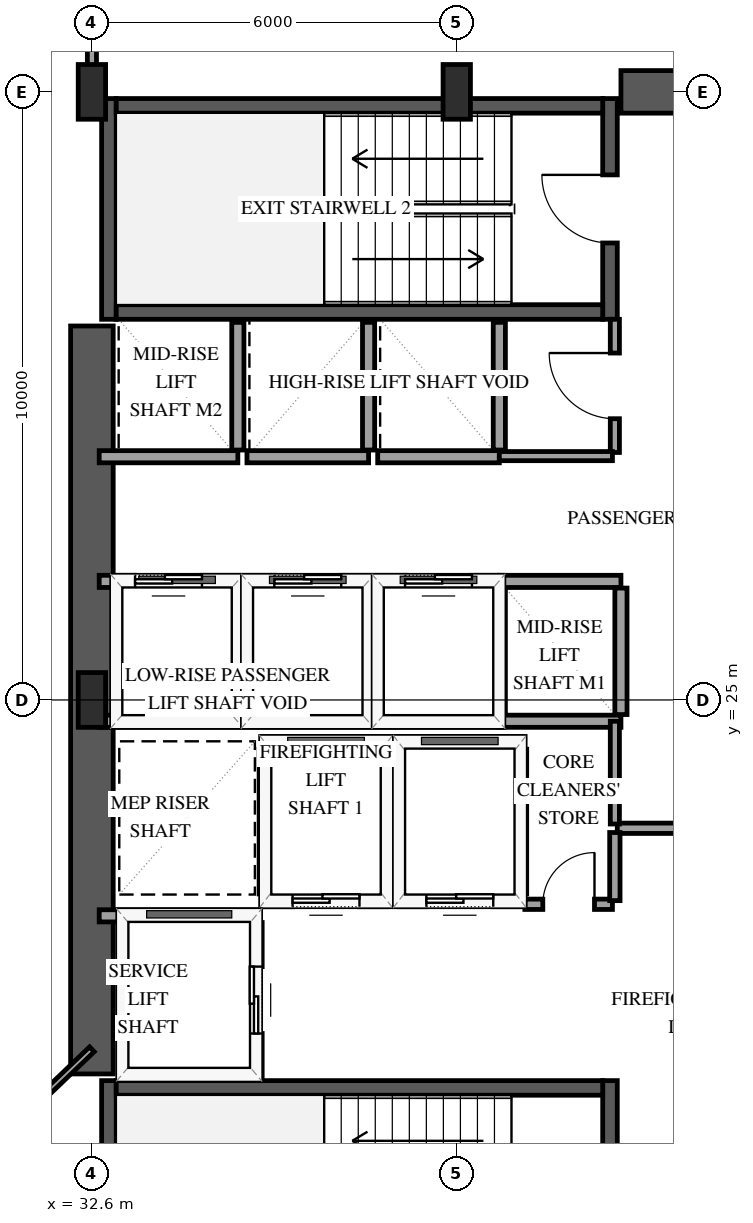
"""IFC4 building model, lengths in metres.
Left out: names, types, materials, properties, quantities, classifications, styles, units other than length and angle.
Written with IfcOpenShell. Run it as: python <this file> out.ifc"""

import sys

from ifc_helpers import new_model, si_unit, direction, frame, frame_2d, origin, origin_2d, place, context, subcontext, project, spatial, rectangle, extrude, element, fill, save


model = new_model("IFC4")
c1 = context("Model", 3, precision=1e-05, world=origin(), true_north=direction((0.0, 1.0)))
c2 = subcontext(c1, "Body", "Model", "MODEL_VIEW")
j1 = project(units=[si_unit("LENGTHUNIT", "METRE"), si_unit("PLANEANGLEUNIT", "RADIAN")], contexts=[c1])
p1 = place(None, origin())
s1 = spatial("IfcSite", under=j1, at=p1, CompositionType="ELEMENT")
p2 = place(p1, origin())
s2 = spatial("IfcBuilding", under=s1, at=p2, CompositionType="ELEMENT")
p3 = place(p2, frame((0.0, 0.0, 58.6)))
s3 = spatial("IfcBuildingStorey", under=s2, at=p3, CompositionType="ELEMENT", Elevation=58.6)
p4 = place(p3, frame((32.88, 15.11, 0.0), z_axis=(0.0, 0.0, 1.0), x_axis=(0.0, 1.0, 0.0)))
e1 = element("IfcWall", 1, at=p4, inside=s3, PredefinedType="SHEAR", context=c2, shape_type="SweptSolid", body=[
    extrude(rectangle(XDim=3.63, YDim=0.24, at=frame_2d((1.815, 0.0))), origin(), (0.0, 0.0, 1.0), 4.0),
])
p5 = place(p3, frame((41.12, 15.11, 0.0), z_axis=(0.0, 0.0, 1.0), x_axis=(0.0, 1.0, 0.0)))
e2 = element("IfcWall", 2, at=p5, inside=s3, PredefinedType="SHEAR", context=c2, shape_type="SweptSolid", body=[
    extrude(rectangle(XDim=3.63, YDim=0.24, at=frame_2d((1.815, 0.0))), origin(), (0.0, 0.0, 1.0), 4.0),
])
p6 = place(p5, frame((1.255, 0.0, 0.0)))
e3 = element("IfcOpeningElement", 3, at=p6, cuts=e2, PredefinedType="OPENING", context=c2, shape_type="SweptSolid", body=[
    extrude(rectangle(XDim=1.12, YDim=2.15, at=frame_2d((0.56, 1.075))), frame((0.0, 0.13, 0.0), z_axis=(0.0, -1.0, 0.0), x_axis=(1.0, 0.0, 0.0)), (0.0, 0.0, 1.0), 0.26),
])
p7 = place(p3, frame((33.0, 18.62, 0.0), z_axis=(0.0, 0.0, 1.0), x_axis=(1.0, 0.0, 0.0)))
e4 = element("IfcWall", 4, at=p7, inside=s3, PredefinedType="SHEAR", context=c2, shape_type="SweptSolid", body=[
    extrude(rectangle(XDim=8.0, YDim=0.24, at=frame_2d((4.0, 0.0))), origin(), (0.0, 0.0, 1.0), 4.0),
])
p8 = place(p3, frame((32.88, 31.26, 0.0), z_axis=(0.0, 0.0, 1.0), x_axis=(0.0, 1.0, 0.0)))
e5 = element("IfcWall", 5, at=p8, inside=s3, PredefinedType="SHEAR", context=c2, shape_type="SweptSolid", body=[
    extrude(rectangle(XDim=3.63, YDim=0.24, at=frame_2d((1.815, 0.0))), origin(), (0.0, 0.0, 1.0), 4.0),
])
p9 = place(p3, frame((41.12, 31.26, 0.0), z_axis=(0.0, 0.0, 1.0), x_axis=(0.0, 1.0, 0.0)))
e6 = element("IfcWall", 6, at=p9, inside=s3, PredefinedType="SHEAR", context=c2, shape_type="SweptSolid", body=[
    extrude(rectangle(XDim=3.63, YDim=0.24, at=frame_2d((1.815, 0.0))), origin(), (0.0, 0.0, 1.0), 4.0),
])
p10 = place(p9, frame((1.255, 0.0, 0.0)))
e7 = element("IfcOpeningElement", 7, at=p10, cuts=e6, PredefinedType="OPENING", context=c2, shape_type="SweptSolid", body=[
    extrude(rectangle(XDim=1.12, YDim=2.15, at=frame_2d((0.56, 1.075))), frame((0.0, 0.13, 0.0), z_axis=(0.0, -1.0, 0.0), x_axis=(1.0, 0.0, 0.0)), (0.0, 0.0, 1.0), 0.26),
])
for number, where, z_axis, x_axis in (
    (8, (33.0, 31.38, 0.0), (0.0, 0.0, 1.0), (1.0, 0.0, 0.0)),
    (9, (33.0, 34.77, 0.0), (0.0, 0.0, 1.0), (1.0, 0.0, 0.0)),
):
    element("IfcWall", number, at=place(p3, frame(where, z_axis=z_axis, x_axis=x_axis)), inside=s3, PredefinedType="SHEAR", context=c2, shape_type="SweptSolid", body=[
        extrude(rectangle(XDim=8.0, YDim=0.24, at=frame_2d((4.0, 0.0))), origin(), (0.0, 0.0, 1.0), 4.0),
    ])
p11 = place(p3, frame((32.6, 18.85, 0.0), z_axis=(0.0, 0.0, 1.0), x_axis=(0.0, 1.0, 0.0)))
e10 = element("IfcWall", 10, at=p11, inside=s3, PredefinedType="SHEAR", context=c2, shape_type="SweptSolid", body=[
    extrude(rectangle(XDim=12.3, YDim=0.7, at=frame_2d((6.15, 0.0))), origin(), (0.0, 0.0, 1.0), 4.0),
])
p12 = place(p3, frame((41.3, 35.0, 0.0), z_axis=(0.0, 0.0, 1.0), x_axis=(1.0, 0.0, 0.0)))
e11 = element("IfcWall", 11, at=p12, inside=s3, PredefinedType="SHEAR", context=c2, shape_type="SweptSolid", body=[
    extrude(rectangle(XDim=2.85, YDim=0.7, at=frame_2d((1.425, 0.0))), origin(), (0.0, 0.0, 1.0), 4.0),
])
for number, where, z_axis, x_axis in (
    (12, (32.6, 25.0, 0.0), (0.0, 0.0, 1.0), (1.0, 0.0, 0.0)),
    (13, (32.6, 35.0, 0.0), (0.0, 0.0, 1.0), (1.0, 0.0, 0.0)),
    (14, (38.6, 35.0, 0.0), (0.0, 0.0, 1.0), (1.0, 0.0, 0.0)),
):
    element("IfcColumn", number, at=place(p3, frame(where, z_axis=z_axis, x_axis=x_axis)), inside=s3, PredefinedType="PILASTER", context=c2, shape_type="SweptSolid", body=[
        extrude(rectangle(XDim=0.45, YDim=0.9, at=origin_2d()), origin(), (0.0, 0.0, 1.0), 4.0),
    ])
p13 = place(p3, frame((35.45, 21.7, 0.0), z_axis=(0.0, 0.0, 1.0), x_axis=(1.0, 0.0, 0.0)))
e15 = element("IfcWall", 15, at=p13, inside=s3, PredefinedType="SOLIDWALL", context=c2, shape_type="SweptSolid", body=[
    extrude(rectangle(XDim=2.0, YDim=0.2, at=frame_2d((1.0, 0.0))), origin(), (0.0, 0.0, 1.0), 3.7),
])
p14 = place(p13, frame((0.45, 0.0, 0.0)))
e16 = element("IfcOpeningElement", 16, at=p14, cuts=e15, PredefinedType="OPENING", context=c2, shape_type="SweptSolid", body=[
    extrude(rectangle(XDim=1.1, YDim=2.15, at=frame_2d((0.55, 1.075))), frame((0.0, 0.11, 0.0), z_axis=(0.0, -1.0, 0.0), x_axis=(1.0, 0.0, 0.0)), (0.0, 0.0, 1.0), 0.22),
])
p15 = place(p3, frame((35.45, 24.3, 0.0), z_axis=(0.0, 0.0, 1.0), x_axis=(1.0, 0.0, 0.0)))
e17 = element("IfcWall", 17, at=p15, inside=s3, PredefinedType="SOLIDWALL", context=c2, shape_type="SweptSolid", body=[
    extrude(rectangle(XDim=2.0, YDim=0.2, at=frame_2d((1.0, 0.0))), origin(), (0.0, 0.0, 1.0), 3.7),
])
for number, where, z_axis, x_axis in (
    (18, (35.45, 21.81, 0.0), (0.0, 0.0, 1.0), (0.0, 1.0, 0.0)),
    (19, (37.45, 21.81, 0.0), (0.0, 0.0, 1.0), (0.0, 1.0, 0.0)),
):
    element("IfcWall", number, at=place(p3, frame(where, z_axis=z_axis, x_axis=x_axis)), inside=s3, PredefinedType="SOLIDWALL", context=c2, shape_type="SweptSolid", body=[
        extrude(rectangle(XDim=2.38, YDim=0.2, at=frame_2d((1.19, 0.0))), origin(), (0.0, 0.0, 1.0), 3.7),
    ])
p16 = place(p3, frame((37.65, 21.7, 0.0), z_axis=(0.0, 0.0, 1.0), x_axis=(1.0, 0.0, 0.0)))
e20 = element("IfcWall", 20, at=p16, inside=s3, PredefinedType="SOLIDWALL", context=c2, shape_type="SweptSolid", body=[
    extrude(rectangle(XDim=2.0, YDim=0.2, at=frame_2d((1.0, 0.0))), origin(), (0.0, 0.0, 1.0), 3.7),
])
p17 = place(p16, frame((0.45, 0.0, 0.0)))
e21 = element("IfcOpeningElement", 21, at=p17, cuts=e20, PredefinedType="OPENING", context=c2, shape_type="SweptSolid", body=[
    extrude(rectangle(XDim=1.1, YDim=2.15, at=frame_2d((0.55, 1.075))), frame((0.0, 0.11, 0.0), z_axis=(0.0, -1.0, 0.0), x_axis=(1.0, 0.0, 0.0)), (0.0, 0.0, 1.0), 0.22),
])
p18 = place(p3, frame((37.65, 24.3, 0.0), z_axis=(0.0, 0.0, 1.0), x_axis=(1.0, 0.0, 0.0)))
e22 = element("IfcWall", 22, at=p18, inside=s3, PredefinedType="SOLIDWALL", context=c2, shape_type="SweptSolid", body=[
    extrude(rectangle(XDim=2.0, YDim=0.2, at=frame_2d((1.0, 0.0))), origin(), (0.0, 0.0, 1.0), 3.7),
])
p19 = place(p3, frame((39.65, 21.81, 0.0), z_axis=(0.0, 0.0, 1.0), x_axis=(0.0, 1.0, 0.0)))
e23 = element("IfcWall", 23, at=p19, inside=s3, PredefinedType="SOLIDWALL", context=c2, shape_type="SweptSolid", body=[
    extrude(rectangle(XDim=2.38, YDim=0.2, at=frame_2d((1.19, 0.0))), origin(), (0.0, 0.0, 1.0), 3.7),
])
p20 = place(p3, frame((32.72, 21.45, 0.0), z_axis=(0.0, 0.0, 1.0), x_axis=(1.0, 0.0, 0.0)))
e24 = element("IfcWall", 24, at=p20, inside=s3, PredefinedType="SOLIDWALL", context=c2, shape_type="SweptSolid", body=[
    extrude(rectangle(XDim=2.58, YDim=0.2, at=frame_2d((1.29, 0.0))), origin(), (0.0, 0.0, 1.0), 3.7),
])
p21 = place(p3, frame((35.3, 18.79, 0.0), z_axis=(0.0, 0.0, 1.0), x_axis=(0.0, 1.0, 0.0)))
e25 = element("IfcWall", 25, at=p21, inside=s3, PredefinedType="SOLIDWALL", context=c2, shape_type="SweptSolid", body=[
    extrude(rectangle(XDim=2.55, YDim=0.2, at=frame_2d((1.275, 0.0))), origin(), (0.0, 0.0, 1.0), 3.7),
])
p22 = place(p21, frame((0.725, 0.0, 0.0)))
e26 = element("IfcOpeningElement", 26, at=p22, cuts=e25, PredefinedType="OPENING", context=c2, shape_type="SweptSolid", body=[
    extrude(rectangle(XDim=1.1, YDim=2.15, at=frame_2d((0.55, 1.075))), frame((0.0, 0.11, 0.0), z_axis=(0.0, -1.0, 0.0), x_axis=(1.0, 0.0, 0.0)), (0.0, 0.0, 1.0), 0.22),
])
p23 = place(p3, frame((32.72, 24.65, 0.0), z_axis=(0.0, 0.0, 1.0), x_axis=(1.0, 0.0, 0.0)))
e27 = element("IfcWall", 27, at=p23, inside=s3, PredefinedType="SOLIDWALL", context=c2, shape_type="SweptSolid", body=[
    extrude(rectangle(XDim=2.28, YDim=0.2, at=frame_2d((1.14, 0.0))), origin(), (0.0, 0.0, 1.0), 3.7),
])
p24 = place(p3, frame((32.72, 26.95, 0.0), z_axis=(0.0, 0.0, 1.0), x_axis=(1.0, 0.0, 0.0)))
e28 = element("IfcWall", 28, at=p24, inside=s3, PredefinedType="SOLIDWALL", context=c2, shape_type="SweptSolid", body=[
    extrude(rectangle(XDim=2.28, YDim=0.2, at=frame_2d((1.14, 0.0))), origin(), (0.0, 0.0, 1.0), 3.7),
])
p25 = place(p24, frame((0.59, 0.0, 0.0)))
e29 = element("IfcOpeningElement", 29, at=p25, cuts=e28, PredefinedType="OPENING", context=c2, shape_type="SweptSolid", body=[
    extrude(rectangle(XDim=1.1, YDim=2.15, at=frame_2d((0.55, 1.075))), frame((0.0, 0.11, 0.0), z_axis=(0.0, -1.0, 0.0), x_axis=(1.0, 0.0, 0.0)), (0.0, 0.0, 1.0), 0.22),
])
p26 = place(p3, frame((35.0, 24.76, 0.0), z_axis=(0.0, 0.0, 1.0), x_axis=(0.0, 1.0, 0.0)))
e30 = element("IfcWall", 30, at=p26, inside=s3, PredefinedType="SOLIDWALL", context=c2, shape_type="SweptSolid", body=[
    extrude(rectangle(XDim=2.08, YDim=0.2, at=frame_2d((1.04, 0.0))), origin(), (0.0, 0.0, 1.0), 3.7),
])
p27 = place(p3, frame((35.15, 24.65, 0.0), z_axis=(0.0, 0.0, 1.0), x_axis=(1.0, 0.0, 0.0)))
e31 = element("IfcWall", 31, at=p27, inside=s3, PredefinedType="SOLIDWALL", context=c2, shape_type="SweptSolid", body=[
    extrude(rectangle(XDim=2.0, YDim=0.2, at=frame_2d((1.0, 0.0))), origin(), (0.0, 0.0, 1.0), 3.7),
])
p28 = place(p3, frame((35.15, 26.95, 0.0), z_axis=(0.0, 0.0, 1.0), x_axis=(1.0, 0.0, 0.0)))
e32 = element("IfcWall", 32, at=p28, inside=s3, PredefinedType="SOLIDWALL", context=c2, shape_type="SweptSolid", body=[
    extrude(rectangle(XDim=2.0, YDim=0.2, at=frame_2d((1.0, 0.0))), origin(), (0.0, 0.0, 1.0), 3.7),
])
p29 = place(p28, frame((0.45, 0.0, 0.0)))
e33 = element("IfcOpeningElement", 33, at=p29, cuts=e32, PredefinedType="OPENING", context=c2, shape_type="SweptSolid", body=[
    extrude(rectangle(XDim=1.1, YDim=2.15, at=frame_2d((0.55, 1.075))), frame((0.0, 0.11, 0.0), z_axis=(0.0, -1.0, 0.0), x_axis=(1.0, 0.0, 0.0)), (0.0, 0.0, 1.0), 0.22),
])
p30 = place(p3, frame((37.15, 24.76, 0.0), z_axis=(0.0, 0.0, 1.0), x_axis=(0.0, 1.0, 0.0)))
e34 = element("IfcWall", 34, at=p30, inside=s3, PredefinedType="SOLIDWALL", context=c2, shape_type="SweptSolid", body=[
    extrude(rectangle(XDim=2.08, YDim=0.2, at=frame_2d((1.04, 0.0))), origin(), (0.0, 0.0, 1.0), 3.7),
])
p31 = place(p3, frame((37.3, 24.65, 0.0), z_axis=(0.0, 0.0, 1.0), x_axis=(1.0, 0.0, 0.0)))
e35 = element("IfcWall", 35, at=p31, inside=s3, PredefinedType="SOLIDWALL", context=c2, shape_type="SweptSolid", body=[
    extrude(rectangle(XDim=2.0, YDim=0.2, at=frame_2d((1.0, 0.0))), origin(), (0.0, 0.0, 1.0), 3.7),
])
p32 = place(p3, frame((37.3, 26.95, 0.0), z_axis=(0.0, 0.0, 1.0), x_axis=(1.0, 0.0, 0.0)))
e36 = element("IfcWall", 36, at=p32, inside=s3, PredefinedType="SOLIDWALL", context=c2, shape_type="SweptSolid", body=[
    extrude(rectangle(XDim=2.0, YDim=0.2, at=frame_2d((1.0, 0.0))), origin(), (0.0, 0.0, 1.0), 3.7),
])
p33 = place(p32, frame((0.45, 0.0, 0.0)))
e37 = element("IfcOpeningElement", 37, at=p33, cuts=e36, PredefinedType="OPENING", context=c2, shape_type="SweptSolid", body=[
    extrude(rectangle(XDim=1.1, YDim=2.15, at=frame_2d((0.55, 1.075))), frame((0.0, 0.11, 0.0), z_axis=(0.0, -1.0, 0.0), x_axis=(1.0, 0.0, 0.0)), (0.0, 0.0, 1.0), 0.22),
])
p34 = place(p3, frame((39.3, 24.76, 0.0), z_axis=(0.0, 0.0, 1.0), x_axis=(0.0, 1.0, 0.0)))
e38 = element("IfcWall", 38, at=p34, inside=s3, PredefinedType="SOLIDWALL", context=c2, shape_type="SweptSolid", body=[
    extrude(rectangle(XDim=2.08, YDim=0.2, at=frame_2d((1.04, 0.0))), origin(), (0.0, 0.0, 1.0), 3.7),
])
for number, where, z_axis, x_axis in (
    (39, (39.3, 24.65, 0.0), (0.0, 0.0, 1.0), (1.0, 0.0, 0.0)),
    (40, (39.3, 26.95, 0.0), (0.0, 0.0, 1.0), (1.0, 0.0, 0.0)),
):
    element("IfcWall", number, at=place(p3, frame(where, z_axis=z_axis, x_axis=x_axis)), inside=s3, PredefinedType="SOLIDWALL", context=c2, shape_type="SweptSolid", body=[
        extrude(rectangle(XDim=2.0, YDim=0.2, at=frame_2d((1.0, 0.0))), origin(), (0.0, 0.0, 1.0), 3.7),
    ])
p35 = place(p3, frame((41.3, 24.76, 0.0), z_axis=(0.0, 0.0, 1.0), x_axis=(0.0, 1.0, 0.0)))
e41 = element("IfcWall", 41, at=p35, inside=s3, PredefinedType="SOLIDWALL", context=c2, shape_type="SweptSolid", body=[
    extrude(rectangle(XDim=2.08, YDim=0.2, at=frame_2d((1.04, 0.0))), origin(), (0.0, 0.0, 1.0), 3.7),
])
p36 = place(p3, frame((32.72, 29.0, 0.0), z_axis=(0.0, 0.0, 1.0), x_axis=(1.0, 0.0, 0.0)))
e42 = element("IfcWall", 42, at=p36, inside=s3, PredefinedType="SOLIDWALL", context=c2, shape_type="SweptSolid", body=[
    extrude(rectangle(XDim=2.28, YDim=0.2, at=frame_2d((1.14, 0.0))), origin(), (0.0, 0.0, 1.0), 3.7),
])
p37 = place(p3, frame((35.0, 29.11, 0.0), z_axis=(0.0, 0.0, 1.0), x_axis=(0.0, 1.0, 0.0)))
e43 = element("IfcWall", 43, at=p37, inside=s3, PredefinedType="SOLIDWALL", context=c2, shape_type="SweptSolid", body=[
    extrude(rectangle(XDim=2.1, YDim=0.2, at=frame_2d((1.05, 0.0))), origin(), (0.0, 0.0, 1.0), 3.7),
])
p38 = place(p3, frame((35.15, 29.0, 0.0), z_axis=(0.0, 0.0, 1.0), x_axis=(1.0, 0.0, 0.0)))
e44 = element("IfcWall", 44, at=p38, inside=s3, PredefinedType="SOLIDWALL", context=c2, shape_type="SweptSolid", body=[
    extrude(rectangle(XDim=2.0, YDim=0.2, at=frame_2d((1.0, 0.0))), origin(), (0.0, 0.0, 1.0), 3.7),
])
p39 = place(p3, frame((37.15, 29.11, 0.0), z_axis=(0.0, 0.0, 1.0), x_axis=(0.0, 1.0, 0.0)))
e45 = element("IfcWall", 45, at=p39, inside=s3, PredefinedType="SOLIDWALL", context=c2, shape_type="SweptSolid", body=[
    extrude(rectangle(XDim=2.1, YDim=0.2, at=frame_2d((1.05, 0.0))), origin(), (0.0, 0.0, 1.0), 3.7),
])
p40 = place(p3, frame((37.3, 29.0, 0.0), z_axis=(0.0, 0.0, 1.0), x_axis=(1.0, 0.0, 0.0)))
e46 = element("IfcWall", 46, at=p40, inside=s3, PredefinedType="SOLIDWALL", context=c2, shape_type="SweptSolid", body=[
    extrude(rectangle(XDim=2.0, YDim=0.2, at=frame_2d((1.0, 0.0))), origin(), (0.0, 0.0, 1.0), 3.7),
])
p41 = place(p3, frame((39.3, 29.11, 0.0), z_axis=(0.0, 0.0, 1.0), x_axis=(0.0, 1.0, 0.0)))
e47 = element("IfcWall", 47, at=p41, inside=s3, PredefinedType="SOLIDWALL", context=c2, shape_type="SweptSolid", body=[
    extrude(rectangle(XDim=2.1, YDim=0.2, at=frame_2d((1.05, 0.0))), origin(), (0.0, 0.0, 1.0), 3.7),
])
p42 = place(p3, frame((32.6, 19.255, 0.0), z_axis=(0.0, 0.0, 1.0), x_axis=(-0.722302567559, -0.691577183615, 0.0)))
e48 = element("IfcWall", 48, at=p42, inside=s3, PredefinedType="PARTITIONING", context=c2, shape_type="SweptSolid", body=[
    extrude(rectangle(XDim=6.675, YDim=0.11, at=frame_2d((3.337, 0.0))), origin(), (0.0, 0.0, 1.0), 3.7),
])
p43 = place(p3, frame((41.24, 22.89, 0.0), z_axis=(0.0, 0.0, 1.0), x_axis=(1.0, 0.0, 0.0)))
e49 = element("IfcWall", 49, at=p43, inside=s3, PredefinedType="PARTITIONING", context=c2, shape_type="SweptSolid", body=[
    extrude(rectangle(XDim=3.32, YDim=0.17, at=frame_2d((1.66, 0.0))), origin(), (0.0, 0.0, 1.0), 3.7),
])
p44 = place(p43, frame((1.12, 0.0, 0.0)))
e50 = element("IfcOpeningElement", 50, at=p44, cuts=e49, PredefinedType="OPENING", context=c2, shape_type="SweptSolid", body=[
    extrude(rectangle(XDim=1.08, YDim=2.15, at=frame_2d((0.54, 1.075))), frame((0.0, 0.095, 0.0), z_axis=(0.0, -1.0, 0.0), x_axis=(1.0, 0.0, 0.0)), (0.0, 0.0, 1.0), 0.19),
])
p45 = place(p3, frame((41.2, 29.07, 0.0), z_axis=(0.0, 0.0, 1.0), x_axis=(0.0, 1.0, 0.0)))
e51 = element("IfcWall", 51, at=p45, inside=s3, PredefinedType="PARTITIONING", context=c2, shape_type="SweptSolid", body=[
    extrude(rectangle(XDim=2.19, YDim=0.15, at=frame_2d((1.095, 0.0))), origin(), (0.0, 0.0, 1.0), 3.7),
])
p46 = place(p45, frame((0.555, 0.0, 0.0)))
e52 = element("IfcOpeningElement", 52, at=p46, cuts=e51, PredefinedType="OPENING", context=c2, shape_type="SweptSolid", body=[
    extrude(rectangle(XDim=1.08, YDim=2.15, at=frame_2d((0.54, 1.075))), frame((0.0, 0.085, 0.0), z_axis=(0.0, -1.0, 0.0), x_axis=(1.0, 0.0, 0.0)), (0.0, 0.0, 1.0), 0.17),
])
p47 = place(p3, frame((32.6, 35.07, 0.0), z_axis=(0.0, 0.0, 1.0), x_axis=(0.0, 1.0, 0.0)))
e53 = element("IfcWall", 53, at=p47, inside=s3, PredefinedType="PARTITIONING", context=c2, shape_type="SweptSolid", body=[
    extrude(rectangle(XDim=1.91, YDim=0.15, at=frame_2d((0.955, 0.0))), origin(), (0.0, 0.0, 1.0), 3.7),
])
p48 = place(p3, frame((39.3, 29.01, 0.0), z_axis=(0.0, 0.0, 1.0), x_axis=(1.0, 0.0, 0.0)))
e54 = element("IfcWall", 54, at=p48, inside=s3, PredefinedType="PARTITIONING", context=c2, shape_type="SweptSolid", body=[
    extrude(rectangle(XDim=1.86, YDim=0.15, at=frame_2d((0.93, 0.0))), origin(), (0.0, 0.0, 1.0), 3.7),
])
p49 = place(p3, frame((41.2, 22.96, 0.0), z_axis=(0.0, 0.0, 1.0), x_axis=(0.0, 1.0, 0.0)))
e55 = element("IfcWall", 55, at=p49, inside=s3, PredefinedType="PARTITIONING", context=c2, shape_type="SweptSolid", body=[
    extrude(rectangle(XDim=1.69, YDim=0.15, at=frame_2d((0.845, 0.0))), origin(), (0.0, 0.0, 1.0), 3.7),
])
p50 = place(p3, frame((39.72, 21.64, 0.0), z_axis=(0.0, 0.0, 1.0), x_axis=(1.0, 0.0, 0.0)))
e56 = element("IfcWall", 56, at=p50, inside=s3, PredefinedType="PARTITIONING", context=c2, shape_type="SweptSolid", body=[
    extrude(rectangle(XDim=1.44, YDim=0.17, at=frame_2d((0.72, 0.0))), origin(), (0.0, 0.0, 1.0), 3.7),
])
p51 = place(p50, frame((0.295, 0.0, 0.0)))
e57 = element("IfcOpeningElement", 57, at=p51, cuts=e56, PredefinedType="OPENING", context=c2, shape_type="SweptSolid", body=[
    extrude(rectangle(XDim=0.85, YDim=2.1, at=frame_2d((0.425, 1.05))), frame((0.0, 0.095, 0.0), z_axis=(0.0, -1.0, 0.0), x_axis=(1.0, 0.0, 0.0)), (0.0, 0.0, 1.0), 0.19),
])
p52 = place(p3, frame((41.2, 21.7, 0.0), z_axis=(0.0, 0.0, 1.0), x_axis=(0.0, 1.0, 0.0)))
e58 = element("IfcWall", 58, at=p52, inside=s3, PredefinedType="PARTITIONING", context=c2, shape_type="SweptSolid", body=[
    extrude(rectangle(XDim=1.12, YDim=0.17, at=frame_2d((0.56, 0.0))), origin(), (0.0, 0.0, 1.0), 3.7),
])
p53 = place(p14, origin())
e59 = element("IfcDoor", 59, at=p53, inside=s3, OperationType="SLIDING_TO_LEFT", PredefinedType="DOOR", context=c2, shape_type="SweptSolid", body=[
    extrude(rectangle(XDim=1.1, YDim=2.15, at=frame_2d((0.55, 1.075))), frame((0.0, 0.025, 0.0), z_axis=(0.0, -1.0, 0.0), x_axis=(1.0, 0.0, 0.0)), (0.0, 0.0, 1.0), 0.05),
])
fill(e16, e59)
p54 = place(p17, origin())
e60 = element("IfcDoor", 60, at=p54, inside=s3, OperationType="SLIDING_TO_LEFT", PredefinedType="DOOR", context=c2, shape_type="SweptSolid", body=[
    extrude(rectangle(XDim=1.1, YDim=2.15, at=frame_2d((0.55, 1.075))), frame((0.0, 0.025, 0.0), z_axis=(0.0, -1.0, 0.0), x_axis=(1.0, 0.0, 0.0)), (0.0, 0.0, 1.0), 0.05),
])
fill(e21, e60)
p55 = place(p22, origin())
e61 = element("IfcDoor", 61, at=p55, inside=s3, OperationType="SLIDING_TO_LEFT", PredefinedType="DOOR", context=c2, shape_type="SweptSolid", body=[
    extrude(rectangle(XDim=1.1, YDim=2.15, at=frame_2d((0.55, 1.075))), frame((0.0, 0.025, 0.0), z_axis=(0.0, -1.0, 0.0), x_axis=(1.0, 0.0, 0.0)), (0.0, 0.0, 1.0), 0.05),
])
fill(e26, e61)
p56 = place(p25, origin())
e62 = element("IfcDoor", 62, at=p56, inside=s3, OperationType="SLIDING_TO_LEFT", PredefinedType="DOOR", context=c2, shape_type="SweptSolid", body=[
    extrude(rectangle(XDim=1.1, YDim=2.15, at=frame_2d((0.55, 1.075))), frame((0.0, 0.025, 0.0), z_axis=(0.0, -1.0, 0.0), x_axis=(1.0, 0.0, 0.0)), (0.0, 0.0, 1.0), 0.05),
])
fill(e29, e62)
p57 = place(p29, origin())
e63 = element("IfcDoor", 63, at=p57, inside=s3, OperationType="SLIDING_TO_LEFT", PredefinedType="DOOR", context=c2, shape_type="SweptSolid", body=[
    extrude(rectangle(XDim=1.1, YDim=2.15, at=frame_2d((0.55, 1.075))), frame((0.0, 0.025, 0.0), z_axis=(0.0, -1.0, 0.0), x_axis=(1.0, 0.0, 0.0)), (0.0, 0.0, 1.0), 0.05),
])
fill(e33, e63)
p58 = place(p33, origin())
e64 = element("IfcDoor", 64, at=p58, inside=s3, OperationType="SLIDING_TO_LEFT", PredefinedType="DOOR", context=c2, shape_type="SweptSolid", body=[
    extrude(rectangle(XDim=1.1, YDim=2.15, at=frame_2d((0.55, 1.075))), frame((0.0, 0.025, 0.0), z_axis=(0.0, -1.0, 0.0), x_axis=(1.0, 0.0, 0.0)), (0.0, 0.0, 1.0), 0.05),
])
fill(e37, e64)
p59 = place(p10, origin())
e65 = element("IfcDoor", 65, at=p59, inside=s3, OperationType="SINGLE_SWING_RIGHT", PredefinedType="DOOR", context=c2, shape_type="SweptSolid", body=[
    extrude(rectangle(XDim=1.12, YDim=2.15, at=frame_2d((0.56, 1.075))), frame((0.0, 0.025, 0.0), z_axis=(0.0, -1.0, 0.0), x_axis=(1.0, 0.0, 0.0)), (0.0, 0.0, 1.0), 0.05),
])
fill(e7, e65)
p60 = place(p46, origin())
e66 = element("IfcDoor", 66, at=p60, inside=s3, OperationType="SINGLE_SWING_RIGHT", PredefinedType="DOOR", context=c2, shape_type="SweptSolid", body=[
    extrude(rectangle(XDim=1.08, YDim=2.15, at=frame_2d((0.54, 1.075))), frame((0.0, 0.025, 0.0), z_axis=(0.0, -1.0, 0.0), x_axis=(1.0, 0.0, 0.0)), (0.0, 0.0, 1.0), 0.05),
])
fill(e52, e66)
p61 = place(p51, origin())
e67 = element("IfcDoor", 67, at=p61, inside=s3, OperationType="SINGLE_SWING_RIGHT", PredefinedType="DOOR", context=c2, shape_type="SweptSolid", body=[
    extrude(rectangle(XDim=0.85, YDim=2.1, at=frame_2d((0.425, 1.05))), frame((0.0, 0.025, 0.0), z_axis=(0.0, -1.0, 0.0), x_axis=(1.0, 0.0, 0.0)), (0.0, 0.0, 1.0), 0.05),
])
fill(e57, e67)
save(model, sys.argv[1])
